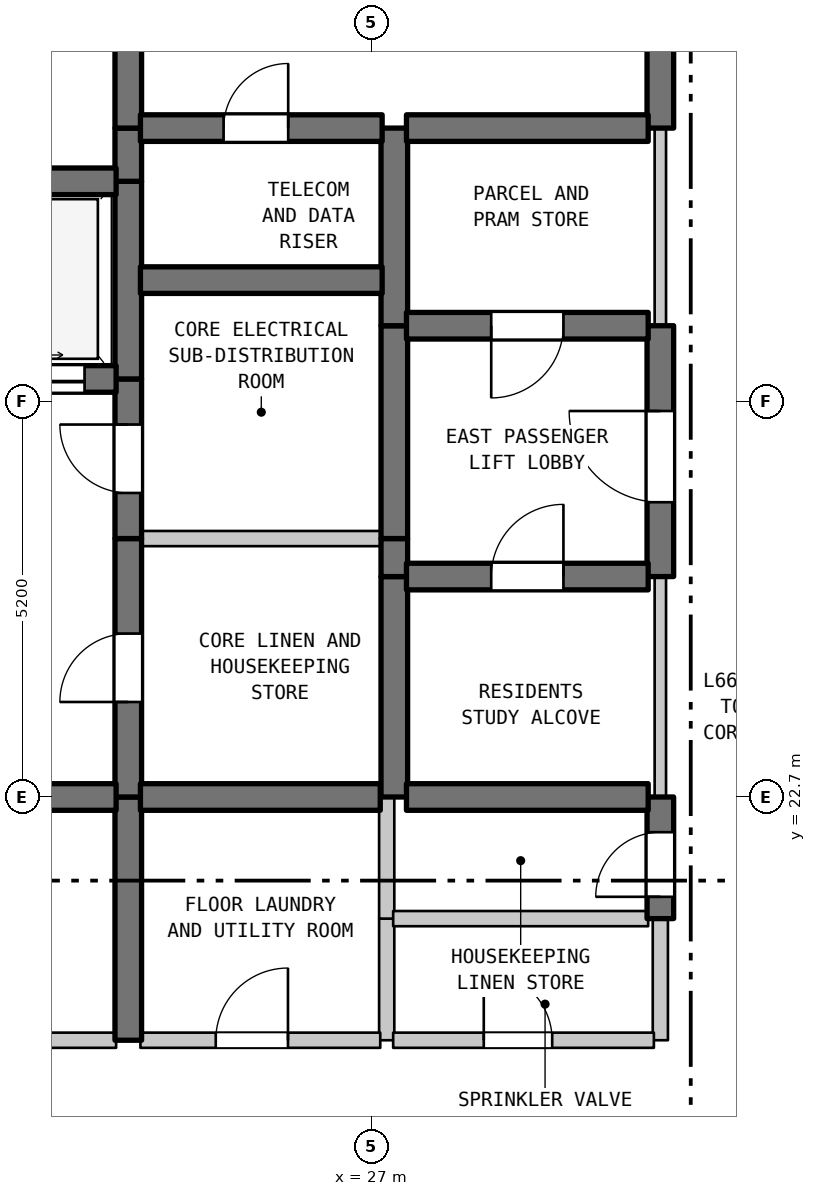
"""IFC4 building model, lengths in metres.
Left out: names, types, materials, properties, quantities, classifications, styles, units other than length and angle.
Written with IfcOpenShell. Run it as: python <this file> out.ifc"""

import sys

from ifc_helpers import new_model, si_unit, direction, frame, frame_2d, origin, place, context, subcontext, project, spatial, rectangle, extrude, element, fill, save


model = new_model("IFC4")
c1 = context("Model", 3, precision=1e-05, world=origin(), true_north=direction((0.0, 1.0)))
c2 = subcontext(c1, "Body", "Model", "MODEL_VIEW")
j1 = project(units=[si_unit("LENGTHUNIT", "METRE"), si_unit("PLANEANGLEUNIT", "RADIAN")], contexts=[c1])
p1 = place(None, origin())
s1 = spatial("IfcSite", under=j1, at=p1, CompositionType="ELEMENT")
p2 = place(p1, origin())
s2 = spatial("IfcBuilding", under=s1, at=p2, CompositionType="ELEMENT")
p3 = place(p2, frame((0.0, 0.0, 265.8)))
s3 = spatial("IfcBuildingStorey", under=s2, at=p3, CompositionType="ELEMENT", Elevation=265.8)
p4 = place(p3, frame((23.8, 19.5, 0.0), z_axis=(0.0, 0.0, 1.0), x_axis=(0.0, 1.0, 0.0)))
e1 = element("IfcWall", 1, at=p4, inside=s3, PredefinedType="SHEAR", context=c2, shape_type="SweptSolid", body=[
    extrude(rectangle(XDim=3.2, YDim=0.35, at=frame_2d((1.6, 0.0))), origin(), (0.0, 0.0, 1.0), 3.39),
])
p5 = place(p3, frame((23.8, 22.7, 0.0), z_axis=(0.0, 0.0, 1.0), x_axis=(0.0, 1.0, 0.0)))
e2 = element("IfcWall", 2, at=p5, inside=s3, PredefinedType="SHEAR", context=c2, shape_type="SweptSolid", body=[
    extrude(rectangle(XDim=3.4, YDim=0.35, at=frame_2d((1.7, 0.0))), origin(), (0.0, 0.0, 1.0), 3.39),
])
p6 = place(p5, frame((1.25, 0.0, 0.0)))
e3 = element("IfcOpeningElement", 3, at=p6, cuts=e2, PredefinedType="OPENING", context=c2, shape_type="SweptSolid", body=[
    extrude(rectangle(XDim=0.9, YDim=2.15, at=frame_2d((0.45, 1.075))), frame((0.0, 0.185, 0.0), z_axis=(0.0, -1.0, 0.0), x_axis=(1.0, 0.0, 0.0)), (0.0, 0.0, 1.0), 0.37),
])
p7 = place(p3, frame((23.8, 26.1, 0.0), z_axis=(0.0, 0.0, 1.0), x_axis=(0.0, 1.0, 0.0)))
e4 = element("IfcWall", 4, at=p7, inside=s3, PredefinedType="SHEAR", context=c2, shape_type="SweptSolid", body=[
    extrude(rectangle(XDim=2.1, YDim=0.35, at=frame_2d((1.05, 0.0))), origin(), (0.0, 0.0, 1.0), 3.39),
])
p8 = place(p7, frame((0.6, 0.0, 0.0)))
e5 = element("IfcOpeningElement", 5, at=p8, cuts=e4, PredefinedType="OPENING", context=c2, shape_type="SweptSolid", body=[
    extrude(rectangle(XDim=0.9, YDim=2.15, at=frame_2d((0.45, 1.075))), frame((0.0, 0.185, 0.0), z_axis=(0.0, -1.0, 0.0), x_axis=(1.0, 0.0, 0.0)), (0.0, 0.0, 1.0), 0.37),
])
p9 = place(p3, frame((23.8, 28.2, 0.0), z_axis=(0.0, 0.0, 1.0), x_axis=(0.0, 1.0, 0.0)))
e6 = element("IfcWall", 6, at=p9, inside=s3, PredefinedType="SHEAR", context=c2, shape_type="SweptSolid", body=[
    extrude(rectangle(XDim=2.6, YDim=0.35, at=frame_2d((1.3, 0.0))), origin(), (0.0, 0.0, 1.0), 3.39),
])
p10 = place(p3, frame((23.8, 30.8, 0.0), z_axis=(0.0, 0.0, 1.0), x_axis=(0.0, 1.0, 0.0)))
e7 = element("IfcWall", 7, at=p10, inside=s3, PredefinedType="SHEAR", context=c2, shape_type="SweptSolid", body=[
    extrude(rectangle(XDim=0.7, YDim=0.35, at=frame_2d((0.35, 0.0))), origin(), (0.0, 0.0, 1.0), 3.39),
])
p11 = place(p3, frame((23.8, 31.5, 0.0), z_axis=(0.0, 0.0, 1.0), x_axis=(0.0, 1.0, 0.0)))
e8 = element("IfcWall", 8, at=p11, inside=s3, PredefinedType="SHEAR", context=c2, shape_type="SweptSolid", body=[
    extrude(rectangle(XDim=3.5, YDim=0.35, at=frame_2d((1.75, 0.0))), origin(), (0.0, 0.0, 1.0), 3.39),
])
p12 = place(p11, frame((1.127, 0.0, 0.0)))
e9 = element("IfcOpeningElement", 9, at=p12, cuts=e8, PredefinedType="OPENING", context=c2, shape_type="SweptSolid", body=[
    extrude(rectangle(XDim=1.1, YDim=2.15, at=frame_2d((0.55, 1.075))), frame((0.0, 0.185, 0.0), z_axis=(0.0, -1.0, 0.0), x_axis=(1.0, 0.0, 0.0)), (0.0, 0.0, 1.0), 0.37),
])
p13 = place(p3, frame((27.2, 19.5, 0.0), z_axis=(0.0, 0.0, 1.0), x_axis=(0.0, 1.0, 0.0)))
e10 = element("IfcWall", 10, at=p13, inside=s3, PredefinedType="STANDARD", context=c2, shape_type="SweptSolid", body=[
    extrude(rectangle(XDim=1.6, YDim=0.2, at=frame_2d((0.8, 0.0))), origin(), (0.0, 0.0, 1.0), 3.39),
])
p14 = place(p3, frame((27.2, 21.1, 0.0), z_axis=(0.0, 0.0, 1.0), x_axis=(0.0, 1.0, 0.0)))
e11 = element("IfcWall", 11, at=p14, inside=s3, PredefinedType="STANDARD", context=c2, shape_type="SweptSolid", body=[
    extrude(rectangle(XDim=1.6, YDim=0.2, at=frame_2d((0.8, 0.0))), origin(), (0.0, 0.0, 1.0), 3.39),
])
p15 = place(p3, frame((27.3, 22.7, 0.0), z_axis=(0.0, 0.0, 1.0), x_axis=(0.0, 1.0, 0.0)))
e12 = element("IfcWall", 12, at=p15, inside=s3, PredefinedType="SHEAR", context=c2, shape_type="SweptSolid", body=[
    extrude(rectangle(XDim=2.9, YDim=0.35, at=frame_2d((1.45, 0.0))), origin(), (0.0, 0.0, 1.0), 3.39),
])
p16 = place(p3, frame((27.3, 25.6, 0.0), z_axis=(0.0, 0.0, 1.0), x_axis=(0.0, 1.0, 0.0)))
e13 = element("IfcWall", 13, at=p16, inside=s3, PredefinedType="SHEAR", context=c2, shape_type="SweptSolid", body=[
    extrude(rectangle(XDim=0.5, YDim=0.35, at=frame_2d((0.25, 0.0))), origin(), (0.0, 0.0, 1.0), 3.39),
])
p17 = place(p3, frame((27.3, 26.1, 0.0), z_axis=(0.0, 0.0, 1.0), x_axis=(0.0, 1.0, 0.0)))
e14 = element("IfcWall", 14, at=p17, inside=s3, PredefinedType="SHEAR", context=c2, shape_type="SweptSolid", body=[
    extrude(rectangle(XDim=2.8, YDim=0.35, at=frame_2d((1.4, 0.0))), origin(), (0.0, 0.0, 1.0), 3.39),
])
p18 = place(p3, frame((27.3, 28.9, 0.0), z_axis=(0.0, 0.0, 1.0), x_axis=(0.0, 1.0, 0.0)))
e15 = element("IfcWall", 15, at=p18, inside=s3, PredefinedType="SHEAR", context=c2, shape_type="SweptSolid", body=[
    extrude(rectangle(XDim=2.6, YDim=0.35, at=frame_2d((1.3, 0.0))), origin(), (0.0, 0.0, 1.0), 3.39),
])
p19 = place(p3, frame((30.8, 19.5, 0.0), z_axis=(0.0, 0.0, 1.0), x_axis=(0.0, 1.0, 0.0)))
e16 = element("IfcWall", 16, at=p19, inside=s3, PredefinedType="STANDARD", context=c2, shape_type="SweptSolid", body=[
    extrude(rectangle(XDim=1.6, YDim=0.2, at=frame_2d((0.8, 0.0))), origin(), (0.0, 0.0, 1.0), 3.39),
])
p20 = place(p3, frame((30.8, 21.1, 0.0), z_axis=(0.0, 0.0, 1.0), x_axis=(0.0, 1.0, 0.0)))
e17 = element("IfcWall", 17, at=p20, inside=s3, PredefinedType="SHEAR", context=c2, shape_type="SweptSolid", body=[
    extrude(rectangle(XDim=1.6, YDim=0.35, at=frame_2d((0.8, 0.0))), origin(), (0.0, 0.0, 1.0), 3.39),
])
p21 = place(p20, frame((0.287, 0.0, 0.0)))
e18 = element("IfcOpeningElement", 18, at=p21, cuts=e17, PredefinedType="OPENING", context=c2, shape_type="SweptSolid", body=[
    extrude(rectangle(XDim=0.85, YDim=2.1, at=frame_2d((0.425, 1.05))), frame((0.0, 0.185, 0.0), z_axis=(0.0, -1.0, 0.0), x_axis=(1.0, 0.0, 0.0)), (0.0, 0.0, 1.0), 0.37),
])
p22 = place(p3, frame((30.8, 22.7, 0.0), z_axis=(0.0, 0.0, 1.0), x_axis=(0.0, 1.0, 0.0)))
e19 = element("IfcWall", 19, at=p22, inside=s3, PredefinedType="STANDARD", context=c2, shape_type="SweptSolid", body=[
    extrude(rectangle(XDim=2.9, YDim=0.15, at=frame_2d((1.45, 0.0))), origin(), (0.0, 0.0, 1.0), 3.39),
])
p23 = place(p3, frame((30.8, 25.6, 0.0), z_axis=(0.0, 0.0, 1.0), x_axis=(0.0, 1.0, 0.0)))
e20 = element("IfcWall", 20, at=p23, inside=s3, PredefinedType="SHEAR", context=c2, shape_type="SweptSolid", body=[
    extrude(rectangle(XDim=3.3, YDim=0.35, at=frame_2d((1.65, 0.0))), origin(), (0.0, 0.0, 1.0), 3.39),
])
p24 = place(p23, frame((0.978, 0.0, 0.0)))
e21 = element("IfcOpeningElement", 21, at=p24, cuts=e20, PredefinedType="OPENING", context=c2, shape_type="SweptSolid", body=[
    extrude(rectangle(XDim=1.2, YDim=2.2, at=frame_2d((0.6, 1.1))), frame((0.0, 0.185, 0.0), z_axis=(0.0, -1.0, 0.0), x_axis=(1.0, 0.0, 0.0)), (0.0, 0.0, 1.0), 0.37),
])
p25 = place(p3, frame((30.8, 28.9, 0.0), z_axis=(0.0, 0.0, 1.0), x_axis=(0.0, 1.0, 0.0)))
e22 = element("IfcWall", 22, at=p25, inside=s3, PredefinedType="STANDARD", context=c2, shape_type="SweptSolid", body=[
    extrude(rectangle(XDim=2.6, YDim=0.15, at=frame_2d((1.3, 0.0))), origin(), (0.0, 0.0, 1.0), 3.39),
])
p26 = place(p3, frame((30.8, 31.5, 0.0), z_axis=(0.0, 0.0, 1.0), x_axis=(0.0, 1.0, 0.0)))
e23 = element("IfcWall", 23, at=p26, inside=s3, PredefinedType="SHEAR", context=c2, shape_type="SweptSolid", body=[
    extrude(rectangle(XDim=3.5, YDim=0.35, at=frame_2d((1.75, 0.0))), origin(), (0.0, 0.0, 1.0), 3.39),
])
p27 = place(p26, frame((1.15, 0.0, 0.0)))
e24 = element("IfcOpeningElement", 24, at=p27, cuts=e23, PredefinedType="OPENING", context=c2, shape_type="SweptSolid", body=[
    extrude(rectangle(XDim=1.2, YDim=2.2, at=frame_2d((0.6, 1.1))), frame((0.0, 0.185, 0.0), z_axis=(0.0, -1.0, 0.0), x_axis=(1.0, 0.0, 0.0)), (0.0, 0.0, 1.0), 0.37),
])
p28 = place(p3, frame((19.16, 19.5, 0.0), z_axis=(0.0, 0.0, 1.0), x_axis=(1.0, 0.0, 0.0)))
e25 = element("IfcWall", 25, at=p28, inside=s3, PredefinedType="STANDARD", context=c2, shape_type="SweptSolid", body=[
    extrude(rectangle(XDim=4.48, YDim=0.2, at=frame_2d((2.24, 0.0))), origin(), (0.0, 0.0, 1.0), 3.39),
])
p29 = place(p28, frame((1.64, 0.0, 0.0)))
e26 = element("IfcOpeningElement", 26, at=p29, cuts=e25, PredefinedType="OPENING", context=c2, shape_type="SweptSolid", body=[
    extrude(rectangle(XDim=1.2, YDim=2.2, at=frame_2d((0.6, 1.1))), frame((0.0, 0.11, 0.0), z_axis=(0.0, -1.0, 0.0), x_axis=(1.0, 0.0, 0.0)), (0.0, 0.0, 1.0), 0.22),
])
p30 = place(p3, frame((23.96, 19.5, 0.0), z_axis=(0.0, 0.0, 1.0), x_axis=(1.0, 0.0, 0.0)))
e27 = element("IfcWall", 27, at=p30, inside=s3, PredefinedType="STANDARD", context=c2, shape_type="SweptSolid", body=[
    extrude(rectangle(XDim=3.155, YDim=0.2, at=frame_2d((1.578, 0.0))), origin(), (0.0, 0.0, 1.0), 3.39),
])
p31 = place(p30, frame((0.991, 0.0, 0.0)))
e28 = element("IfcOpeningElement", 28, at=p31, cuts=e27, PredefinedType="OPENING", context=c2, shape_type="SweptSolid", body=[
    extrude(rectangle(XDim=0.95, YDim=2.15, at=frame_2d((0.475, 1.075))), frame((0.0, 0.11, 0.0), z_axis=(0.0, -1.0, 0.0), x_axis=(1.0, 0.0, 0.0)), (0.0, 0.0, 1.0), 0.22),
])
p32 = place(p3, frame((27.285, 19.5, 0.0), z_axis=(0.0, 0.0, 1.0), x_axis=(1.0, 0.0, 0.0)))
e29 = element("IfcWall", 29, at=p32, inside=s3, PredefinedType="STANDARD", context=c2, shape_type="SweptSolid", body=[
    extrude(rectangle(XDim=3.43, YDim=0.2, at=frame_2d((1.715, 0.0))), origin(), (0.0, 0.0, 1.0), 3.39),
])
p33 = place(p32, frame((1.192, 0.0, 0.0)))
e30 = element("IfcOpeningElement", 30, at=p33, cuts=e29, PredefinedType="OPENING", context=c2, shape_type="SweptSolid", body=[
    extrude(rectangle(XDim=0.9, YDim=2.15, at=frame_2d((0.45, 1.075))), frame((0.0, 0.11, 0.0), z_axis=(0.0, -1.0, 0.0), x_axis=(1.0, 0.0, 0.0)), (0.0, 0.0, 1.0), 0.22),
])
p34 = place(p3, frame((27.285, 21.1, 0.0), z_axis=(0.0, 0.0, 1.0), x_axis=(1.0, 0.0, 0.0)))
e31 = element("IfcWall", 31, at=p34, inside=s3, PredefinedType="STANDARD", context=c2, shape_type="SweptSolid", body=[
    extrude(rectangle(XDim=3.355, YDim=0.2, at=frame_2d((1.677, 0.0))), origin(), (0.0, 0.0, 1.0), 3.39),
])
p35 = place(p3, frame((19.16, 22.7, 0.0), z_axis=(0.0, 0.0, 1.0), x_axis=(1.0, 0.0, 0.0)))
e32 = element("IfcWall", 32, at=p35, inside=s3, PredefinedType="SHEAR", context=c2, shape_type="SweptSolid", body=[
    extrude(rectangle(XDim=4.48, YDim=0.35, at=frame_2d((2.24, 0.0))), origin(), (0.0, 0.0, 1.0), 3.39),
])
p36 = place(p35, frame((1.64, 0.0, 0.0)))
e33 = element("IfcOpeningElement", 33, at=p36, cuts=e32, PredefinedType="OPENING", context=c2, shape_type="SweptSolid", body=[
    extrude(rectangle(XDim=1.2, YDim=2.2, at=frame_2d((0.6, 1.1))), frame((0.0, 0.185, 0.0), z_axis=(0.0, -1.0, 0.0), x_axis=(1.0, 0.0, 0.0)), (0.0, 0.0, 1.0), 0.37),
])
p37 = place(p3, frame((23.96, 22.7, 0.0), z_axis=(0.0, 0.0, 1.0), x_axis=(1.0, 0.0, 0.0)))
e34 = element("IfcWall", 34, at=p37, inside=s3, PredefinedType="SHEAR", context=c2, shape_type="SweptSolid", body=[
    extrude(rectangle(XDim=3.155, YDim=0.35, at=frame_2d((1.578, 0.0))), origin(), (0.0, 0.0, 1.0), 3.39),
])
p38 = place(p3, frame((27.46, 22.7, 0.0), z_axis=(0.0, 0.0, 1.0), x_axis=(1.0, 0.0, 0.0)))
e35 = element("IfcWall", 35, at=p38, inside=s3, PredefinedType="SHEAR", context=c2, shape_type="SweptSolid", body=[
    extrude(rectangle(XDim=3.18, YDim=0.35, at=frame_2d((1.59, 0.0))), origin(), (0.0, 0.0, 1.0), 3.39),
])
p39 = place(p3, frame((27.46, 25.6, 0.0), z_axis=(0.0, 0.0, 1.0), x_axis=(1.0, 0.0, 0.0)))
e36 = element("IfcWall", 36, at=p39, inside=s3, PredefinedType="SHEAR", context=c2, shape_type="SweptSolid", body=[
    extrude(rectangle(XDim=3.18, YDim=0.35, at=frame_2d((1.59, 0.0))), origin(), (0.0, 0.0, 1.0), 3.39),
])
p40 = place(p39, frame((1.115, 0.0, 0.0)))
e37 = element("IfcOpeningElement", 37, at=p40, cuts=e36, PredefinedType="OPENING", context=c2, shape_type="SweptSolid", body=[
    extrude(rectangle(XDim=0.95, YDim=2.15, at=frame_2d((0.475, 1.075))), frame((0.0, 0.185, 0.0), z_axis=(0.0, -1.0, 0.0), x_axis=(1.0, 0.0, 0.0)), (0.0, 0.0, 1.0), 0.37),
])
p41 = place(p3, frame((23.96, 26.1, 0.0), z_axis=(0.0, 0.0, 1.0), x_axis=(1.0, 0.0, 0.0)))
e38 = element("IfcWall", 38, at=p41, inside=s3, PredefinedType="STANDARD", context=c2, shape_type="SweptSolid", body=[
    extrude(rectangle(XDim=3.18, YDim=0.2, at=frame_2d((1.59, 0.0))), origin(), (0.0, 0.0, 1.0), 3.39),
])
p42 = place(p3, frame((19.16, 28.2, 0.0), z_axis=(0.0, 0.0, 1.0), x_axis=(1.0, 0.0, 0.0)))
e39 = element("IfcWall", 39, at=p42, inside=s3, PredefinedType="SHEAR", context=c2, shape_type="SweptSolid", body=[
    extrude(rectangle(XDim=4.48, YDim=0.35, at=frame_2d((2.24, 0.0))), origin(), (0.0, 0.0, 1.0), 3.39),
])
p43 = place(p42, frame((0.415, 0.0, 0.0)))
e40 = element("IfcOpeningElement", 40, at=p43, cuts=e39, PredefinedType="OPENING", context=c2, shape_type="SweptSolid", body=[
    extrude(rectangle(XDim=1.25, YDim=2.2, at=frame_2d((0.625, 1.1))), frame((0.0, 0.185, 0.0), z_axis=(0.0, -1.0, 0.0), x_axis=(1.0, 0.0, 0.0)), (0.0, 0.0, 1.0), 0.37),
])
p44 = place(p42, frame((2.815, 0.0, 0.0)))
e41 = element("IfcOpeningElement", 41, at=p44, cuts=e39, PredefinedType="OPENING", context=c2, shape_type="SweptSolid", body=[
    extrude(rectangle(XDim=1.25, YDim=2.2, at=frame_2d((0.625, 1.1))), frame((0.0, 0.185, 0.0), z_axis=(0.0, -1.0, 0.0), x_axis=(1.0, 0.0, 0.0)), (0.0, 0.0, 1.0), 0.37),
])
p45 = place(p3, frame((27.46, 28.9, 0.0), z_axis=(0.0, 0.0, 1.0), x_axis=(1.0, 0.0, 0.0)))
e42 = element("IfcWall", 42, at=p45, inside=s3, PredefinedType="SHEAR", context=c2, shape_type="SweptSolid", body=[
    extrude(rectangle(XDim=3.18, YDim=0.35, at=frame_2d((1.59, 0.0))), origin(), (0.0, 0.0, 1.0), 3.39),
])
p46 = place(p45, frame((1.115, 0.0, 0.0)))
e43 = element("IfcOpeningElement", 43, at=p46, cuts=e42, PredefinedType="OPENING", context=c2, shape_type="SweptSolid", body=[
    extrude(rectangle(XDim=0.95, YDim=2.15, at=frame_2d((0.475, 1.075))), frame((0.0, 0.185, 0.0), z_axis=(0.0, -1.0, 0.0), x_axis=(1.0, 0.0, 0.0)), (0.0, 0.0, 1.0), 0.37),
])
p47 = place(p3, frame((23.96, 29.5, 0.0), z_axis=(0.0, 0.0, 1.0), x_axis=(1.0, 0.0, 0.0)))
e44 = element("IfcWall", 44, at=p47, inside=s3, PredefinedType="SHEAR", context=c2, shape_type="SweptSolid", body=[
    extrude(rectangle(XDim=3.18, YDim=0.35, at=frame_2d((1.59, 0.0))), origin(), (0.0, 0.0, 1.0), 3.39),
])
p48 = place(p3, frame((19.16, 30.8, 0.0), z_axis=(0.0, 0.0, 1.0), x_axis=(1.0, 0.0, 0.0)))
e45 = element("IfcWall", 45, at=p48, inside=s3, PredefinedType="SHEAR", context=c2, shape_type="SweptSolid", body=[
    extrude(rectangle(XDim=4.48, YDim=0.35, at=frame_2d((2.24, 0.0))), origin(), (0.0, 0.0, 1.0), 3.39),
])
p49 = place(p3, frame((23.96, 31.5, 0.0), z_axis=(0.0, 0.0, 1.0), x_axis=(1.0, 0.0, 0.0)))
e46 = element("IfcWall", 46, at=p49, inside=s3, PredefinedType="SHEAR", context=c2, shape_type="SweptSolid", body=[
    extrude(rectangle(XDim=3.18, YDim=0.35, at=frame_2d((1.59, 0.0))), origin(), (0.0, 0.0, 1.0), 3.39),
])
p50 = place(p49, frame((1.094, 0.0, 0.0)))
e47 = element("IfcOpeningElement", 47, at=p50, cuts=e46, PredefinedType="OPENING", context=c2, shape_type="SweptSolid", body=[
    extrude(rectangle(XDim=0.85, YDim=2.1, at=frame_2d((0.425, 1.05))), frame((0.0, 0.185, 0.0), z_axis=(0.0, -1.0, 0.0), x_axis=(1.0, 0.0, 0.0)), (0.0, 0.0, 1.0), 0.37),
])
p51 = place(p3, frame((27.46, 31.5, 0.0), z_axis=(0.0, 0.0, 1.0), x_axis=(1.0, 0.0, 0.0)))
e48 = element("IfcWall", 48, at=p51, inside=s3, PredefinedType="SHEAR", context=c2, shape_type="SweptSolid", body=[
    extrude(rectangle(XDim=3.18, YDim=0.35, at=frame_2d((1.59, 0.0))), origin(), (0.0, 0.0, 1.0), 3.39),
])
p52 = place(p6, origin())
e49 = element("IfcDoor", 49, at=p52, inside=s3, OperationType="SINGLE_SWING_LEFT", PredefinedType="DOOR", context=c2, shape_type="SweptSolid", body=[
    extrude(rectangle(XDim=0.9, YDim=2.15, at=frame_2d((0.45, 1.075))), frame((0.0, 0.025, 0.0), z_axis=(0.0, -1.0, 0.0), x_axis=(1.0, 0.0, 0.0)), (0.0, 0.0, 1.0), 0.05),
])
fill(e3, e49)
p53 = place(p8, origin())
e50 = element("IfcDoor", 50, at=p53, inside=s3, OperationType="SINGLE_SWING_RIGHT", PredefinedType="DOOR", context=c2, shape_type="SweptSolid", body=[
    extrude(rectangle(XDim=0.9, YDim=2.15, at=frame_2d((0.45, 1.075))), frame((0.0, 0.025, 0.0), z_axis=(0.0, -1.0, 0.0), x_axis=(1.0, 0.0, 0.0)), (0.0, 0.0, 1.0), 0.05),
])
fill(e5, e50)
p54 = place(p21, origin())
e51 = element("IfcDoor", 51, at=p54, inside=s3, OperationType="SINGLE_SWING_LEFT", PredefinedType="DOOR", context=c2, shape_type="SweptSolid", body=[
    extrude(rectangle(XDim=0.85, YDim=2.1, at=frame_2d((0.425, 1.05))), frame((0.0, 0.025, 0.0), z_axis=(0.0, -1.0, 0.0), x_axis=(1.0, 0.0, 0.0)), (0.0, 0.0, 1.0), 0.05),
])
fill(e18, e51)
p55 = place(p24, origin())
e52 = element("IfcDoor", 52, at=p55, inside=s3, OperationType="SINGLE_SWING_RIGHT", PredefinedType="DOOR", context=c2, shape_type="SweptSolid", body=[
    extrude(rectangle(XDim=1.2, YDim=2.2, at=frame_2d((0.6, 1.1))), frame((0.0, 0.025, 0.0), z_axis=(0.0, -1.0, 0.0), x_axis=(1.0, 0.0, 0.0)), (0.0, 0.0, 1.0), 0.05),
])
fill(e21, e52)
p56 = place(p31, origin())
e53 = element("IfcDoor", 53, at=p56, inside=s3, OperationType="SINGLE_SWING_RIGHT", PredefinedType="DOOR", context=c2, shape_type="SweptSolid", body=[
    extrude(rectangle(XDim=0.95, YDim=2.15, at=frame_2d((0.475, 1.075))), frame((0.0, 0.025, 0.0), z_axis=(0.0, -1.0, 0.0), x_axis=(1.0, 0.0, 0.0)), (0.0, 0.0, 1.0), 0.05),
])
fill(e28, e53)
p57 = place(p33, origin())
e54 = element("IfcDoor", 54, at=p57, inside=s3, OperationType="SINGLE_SWING_LEFT", PredefinedType="DOOR", context=c2, shape_type="SweptSolid", body=[
    extrude(rectangle(XDim=0.9, YDim=2.15, at=frame_2d((0.45, 1.075))), frame((0.0, 0.025, 0.0), z_axis=(0.0, -1.0, 0.0), x_axis=(1.0, 0.0, 0.0)), (0.0, 0.0, 1.0), 0.05),
])
fill(e30, e54)
p58 = place(p40, origin())
e55 = element("IfcDoor", 55, at=p58, inside=s3, OperationType="SINGLE_SWING_RIGHT", PredefinedType="DOOR", context=c2, shape_type="SweptSolid", body=[
    extrude(rectangle(XDim=0.95, YDim=2.15, at=frame_2d((0.475, 1.075))), frame((0.0, 0.025, 0.0), z_axis=(0.0, -1.0, 0.0), x_axis=(1.0, 0.0, 0.0)), (0.0, 0.0, 1.0), 0.05),
])
fill(e37, e55)
p59 = place(p44, origin())
e56 = element("IfcDoor", 56, at=p59, inside=s3, OperationType="DOUBLE_DOOR_SLIDING", PredefinedType="DOOR", context=c2, shape_type="SweptSolid", body=[
    extrude(rectangle(XDim=1.25, YDim=2.2, at=frame_2d((0.625, 1.1))), frame((0.0, 0.025, 0.0), z_axis=(0.0, -1.0, 0.0), x_axis=(1.0, 0.0, 0.0)), (0.0, 0.0, 1.0), 0.05),
])
fill(e41, e56)
p60 = place(p46, frame((0.95, 0.0, 0.0), z_axis=(0.0, 0.0, 1.0), x_axis=(-1.0, 0.0, 0.0)))
e57 = element("IfcDoor", 57, at=p60, inside=s3, OperationType="SINGLE_SWING_LEFT", PredefinedType="DOOR", context=c2, shape_type="SweptSolid", body=[
    extrude(rectangle(XDim=0.95, YDim=2.15, at=frame_2d((0.475, 1.075))), frame((0.0, 0.025, 0.0), z_axis=(0.0, -1.0, 0.0), x_axis=(1.0, 0.0, 0.0)), (0.0, 0.0, 1.0), 0.05),
])
fill(e43, e57)
p61 = place(p50, origin())
e58 = element("IfcDoor", 58, at=p61, inside=s3, OperationType="SINGLE_SWING_RIGHT", PredefinedType="DOOR", context=c2, shape_type="SweptSolid", body=[
    extrude(rectangle(XDim=0.85, YDim=2.1, at=frame_2d((0.425, 1.05))), frame((0.0, 0.025, 0.0), z_axis=(0.0, -1.0, 0.0), x_axis=(1.0, 0.0, 0.0)), (0.0, 0.0, 1.0), 0.05),
])
fill(e47, e58)
save(model, sys.argv[1])
